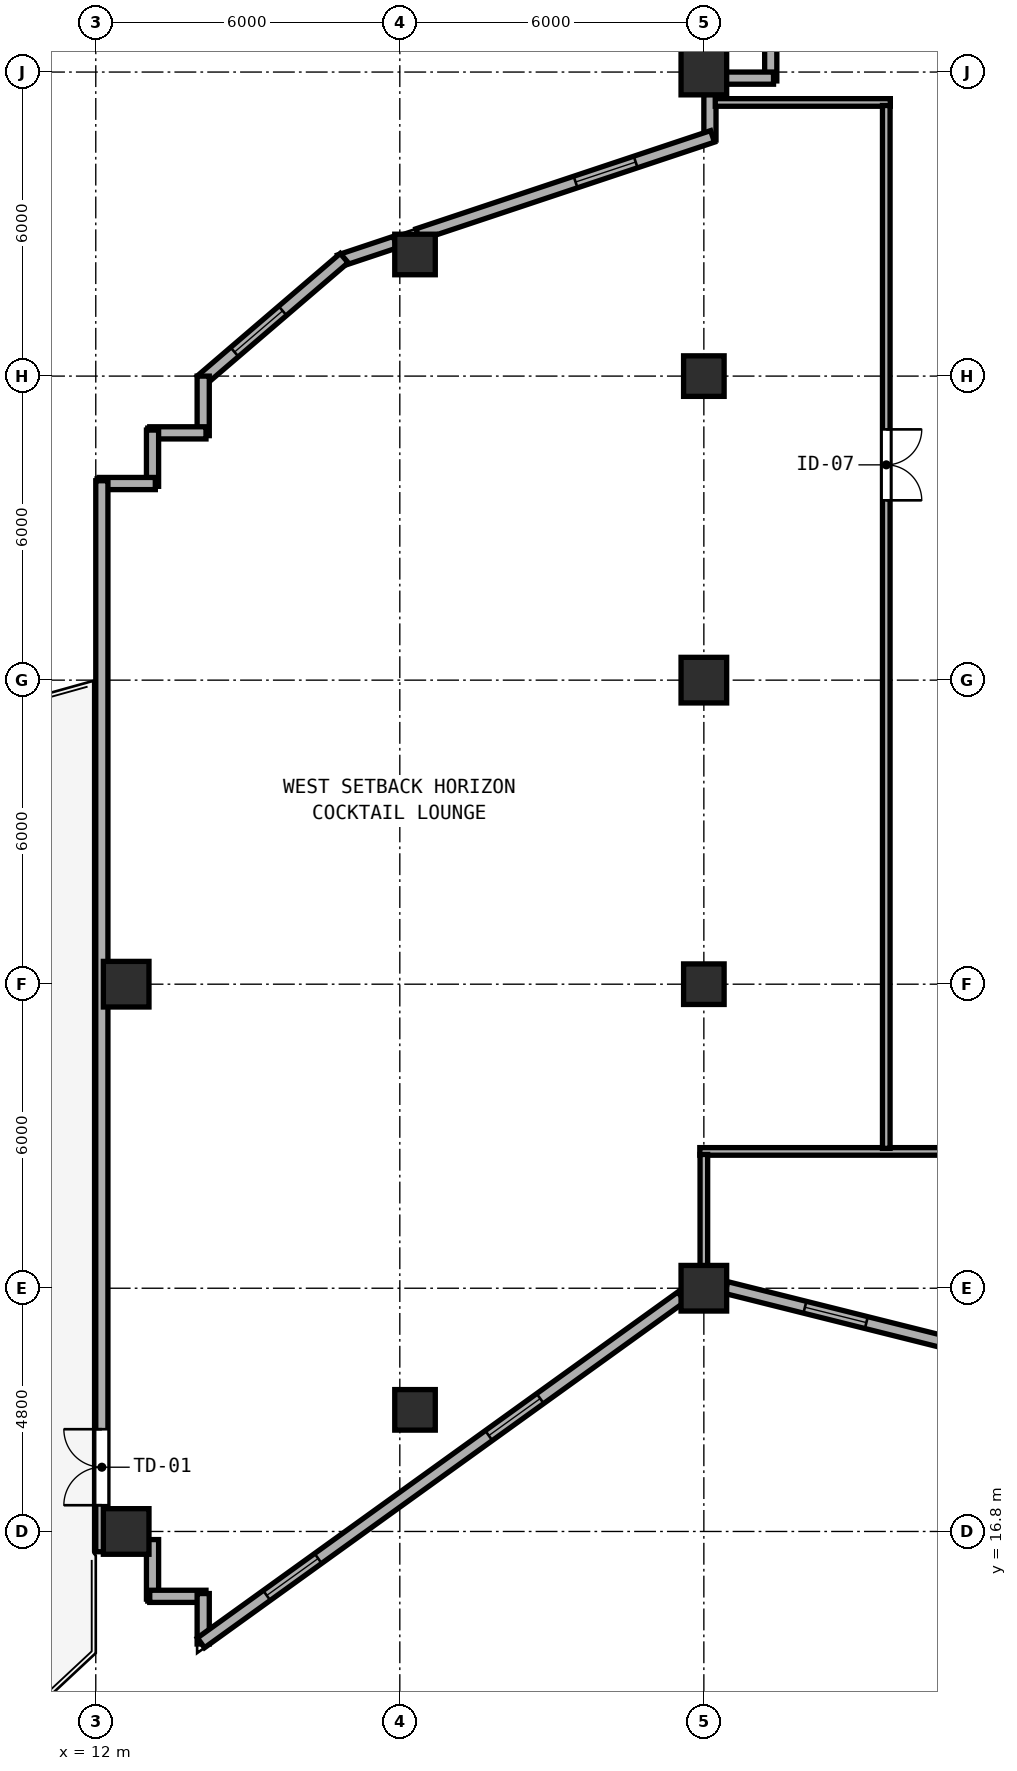
"""IFC4 building model, lengths in metres.
Left out: names, types, materials, properties, quantities, classifications, styles, units other than length and angle.
Written with IfcOpenShell. Run it as: python <this file> out.ifc"""

import sys

from ifc_helpers import new_model, si_unit, direction, frame, frame_2d, origin, origin_2d, place, context, subcontext, project, spatial, rectangle, hollow_rectangle, extrude, element, fill, save


model = new_model("IFC4")
c1 = context("Model", 3, precision=1e-05, world=origin(), true_north=direction((0.0, 1.0)))
c2 = subcontext(c1, "Body", "Model", "MODEL_VIEW")
j1 = project(units=[si_unit("LENGTHUNIT", "METRE"), si_unit("PLANEANGLEUNIT", "RADIAN")], contexts=[c1])
p1 = place(None, origin())
s1 = spatial("IfcSite", under=j1, at=p1, CompositionType="ELEMENT")
p2 = place(p1, origin())
s2 = spatial("IfcBuilding", under=s1, at=p2, CompositionType="ELEMENT")
p3 = place(p2, frame((0.0, 0.0, 164.6)))
s3 = spatial("IfcBuildingStorey", under=s2, at=p3, CompositionType="ELEMENT", Elevation=164.6)
for number, where, z_axis, x_axis in (
    (1, (24.0, 21.6, 0.0), (0.0, 0.0, 1.0), (1.0, 0.0, 0.0)),
    (2, (24.0, 33.6, 0.0), (0.0, 0.0, 1.0), (1.0, 0.0, 0.0)),
    (3, (24.0, 45.6, 0.0), (0.0, 0.0, 1.0), (1.0, 0.0, 0.0)),
    (4, (12.6, 16.8, 0.0), (0.0, 0.0, 1.0), (1.0, 0.0, 0.0)),
    (5, (12.6, 27.6, 0.0), (0.0, 0.0, 1.0), (1.0, 0.0, 0.0)),
):
    element("IfcColumn", number, at=place(p3, frame(where, z_axis=z_axis, x_axis=x_axis)), inside=s3, PredefinedType="COLUMN", context=c2, shape_type="SweptSolid", body=[
        extrude(hollow_rectangle(XDim=0.9, YDim=0.9, WallThickness=0.034, at=origin_2d()), origin(), (0.0, 0.0, 1.0), 4.4),
    ])
for number, where, z_axis, x_axis in (
    (6, (24.0, 27.6, 0.0), (0.0, 0.0, 1.0), (1.0, 0.0, 0.0)),
    (7, (24.0, 39.6, 0.0), (0.0, 0.0, 1.0), (1.0, 0.0, 0.0)),
    (8, (18.3, 19.2, 0.0), (0.0, 0.0, 1.0), (1.0, 0.0, 0.0)),
    (9, (18.3, 42.0, 0.0), (0.0, 0.0, 1.0), (1.0, 0.0, 0.0)),
):
    element("IfcColumn", number, at=place(p3, frame(where, z_axis=z_axis, x_axis=x_axis)), inside=s3, PredefinedType="COLUMN", context=c2, shape_type="SweptSolid", body=[
        extrude(hollow_rectangle(XDim=0.8, YDim=0.8, WallThickness=0.03, at=origin_2d()), origin(), (0.0, 0.0, 1.0), 4.4),
    ])
p4 = place(p3, frame((25.32, 46.735, 0.0), z_axis=(0.0, 0.0, 1.0), x_axis=(0.0, -1.0, 0.0)))
e10 = element("IfcWall", 10, at=p4, inside=s3, PredefinedType="SOLIDWALL", context=c2, shape_type="SweptSolid", body=[
    extrude(rectangle(XDim=1.31, YDim=0.24, at=frame_2d((0.655, 0.0))), origin(), (0.0, 0.0, 1.0), 4.22),
])
p5 = place(p3, frame((25.375, 45.48, 0.0), z_axis=(0.0, 0.0, 1.0), x_axis=(-1.0, 0.0, 0.0)))
e11 = element("IfcWall", 11, at=p5, inside=s3, PredefinedType="SOLIDWALL", context=c2, shape_type="SweptSolid", body=[
    extrude(rectangle(XDim=0.933, YDim=0.24, at=frame_2d((0.467, 0.0))), origin(), (0.0, 0.0, 1.0), 4.22),
])
p6 = place(p3, frame((24.12, 45.158, 0.0), z_axis=(0.0, 0.0, 1.0), x_axis=(0.0, -1.0, 0.0)))
e12 = element("IfcWall", 12, at=p6, inside=s3, PredefinedType="SOLIDWALL", context=c2, shape_type="SweptSolid", body=[
    extrude(rectangle(XDim=0.899, YDim=0.24, at=frame_2d((0.45, 0.0))), origin(), (0.0, 0.0, 1.0), 3.815),
])
p7 = place(p3, frame((24.172, 44.331, 0.0), z_axis=(0.0, 0.0, 1.0), x_axis=(-0.94869126158, -0.316203874426, 0.0)))
e13 = element("IfcWall", 13, at=p7, inside=s3, PredefinedType="SOLIDWALL", context=c2, shape_type="SweptSolid", body=[
    extrude(rectangle(XDim=6.131, YDim=0.24, at=frame_2d((3.066, 0.0))), origin(), (0.0, 0.0, 1.0), 3.815),
])
p8 = place(p7, frame((1.6, 0.0, 0.85)))
e14 = element("IfcOpeningElement", 14, at=p8, cuts=e13, PredefinedType="OPENING", context=c2, shape_type="SweptSolid", body=[
    extrude(rectangle(XDim=1.25, YDim=1.95, at=frame_2d((0.625, 0.975))), frame((0.0, 0.13, 0.0), z_axis=(0.0, -1.0, 0.0), x_axis=(1.0, 0.0, 0.0)), (0.0, 0.0, 1.0), 0.26),
])
p9 = place(p3, frame((17.908, 42.243, 0.0), z_axis=(0.0, 0.0, 1.0), x_axis=(-0.948662237962, -0.316290939272, 0.0)))
e15 = element("IfcWall", 15, at=p9, inside=s3, PredefinedType="SOLIDWALL", context=c2, shape_type="SweptSolid", body=[
    extrude(rectangle(XDim=1.159, YDim=0.24, at=frame_2d((0.58, 0.0))), origin(), (0.0, 0.0, 1.0), 4.22),
])
p10 = place(p3, frame((16.902, 41.929, 0.0), z_axis=(0.0, 0.0, 1.0), x_axis=(-0.759275136126, -0.650769750112, 0.0)))
e16 = element("IfcWall", 16, at=p10, inside=s3, PredefinedType="SOLIDWALL", context=c2, shape_type="SweptSolid", body=[
    extrude(rectangle(XDim=3.719, YDim=0.24, at=frame_2d((1.86, 0.0))), origin(), (0.0, 0.0, 1.0), 4.22),
])
p11 = place(p10, frame((1.6, 0.0, 0.85)))
e17 = element("IfcOpeningElement", 17, at=p11, cuts=e16, PredefinedType="OPENING", context=c2, shape_type="SweptSolid", body=[
    extrude(rectangle(XDim=1.25, YDim=1.95, at=frame_2d((0.625, 0.975))), frame((0.0, 0.13, 0.0), z_axis=(0.0, -1.0, 0.0), x_axis=(1.0, 0.0, 0.0)), (0.0, 0.0, 1.0), 0.26),
])
p12 = place(p3, frame((14.12, 39.6, 0.0), z_axis=(0.0, 0.0, 1.0), x_axis=(0.0, -1.0, 0.0)))
e18 = element("IfcWall", 18, at=p12, inside=s3, PredefinedType="SOLIDWALL", context=c2, shape_type="SweptSolid", body=[
    extrude(rectangle(XDim=1.175, YDim=0.24, at=frame_2d((0.587, 0.0))), origin(), (0.0, 0.0, 1.0), 4.22),
])
p13 = place(p3, frame((14.175, 38.48, 0.0), z_axis=(0.0, 0.0, 1.0), x_axis=(-1.0, 0.0, 0.0)))
e19 = element("IfcWall", 19, at=p13, inside=s3, PredefinedType="SOLIDWALL", context=c2, shape_type="SweptSolid", body=[
    extrude(rectangle(XDim=1.11, YDim=0.24, at=frame_2d((0.555, 0.0))), origin(), (0.0, 0.0, 1.0), 4.22),
])
p14 = place(p3, frame((13.12, 38.535, 0.0), z_axis=(0.0, 0.0, 1.0), x_axis=(0.0, -1.0, 0.0)))
e20 = element("IfcWall", 20, at=p14, inside=s3, PredefinedType="SOLIDWALL", context=c2, shape_type="SweptSolid", body=[
    extrude(rectangle(XDim=1.11, YDim=0.24, at=frame_2d((0.555, 0.0))), origin(), (0.0, 0.0, 1.0), 4.22),
])
p15 = place(p3, frame((13.175, 37.48, 0.0), z_axis=(0.0, 0.0, 1.0), x_axis=(-1.0, 0.0, 0.0)))
e21 = element("IfcWall", 21, at=p15, inside=s3, PredefinedType="SOLIDWALL", context=c2, shape_type="SweptSolid", body=[
    extrude(rectangle(XDim=1.11, YDim=0.24, at=frame_2d((0.555, 0.0))), origin(), (0.0, 0.0, 1.0), 4.22),
])
p16 = place(p3, frame((12.12, 37.535, 0.0), z_axis=(0.0, 0.0, 1.0), x_axis=(0.0, -1.0, 0.0)))
e22 = element("IfcWall", 22, at=p16, inside=s3, PredefinedType="SOLIDWALL", context=c2, shape_type="SweptSolid", body=[
    extrude(rectangle(XDim=21.135, YDim=0.24, at=frame_2d((10.567, 0.0))), origin(), (0.0, 0.0, 1.0), 4.22),
])
p17 = place(p16, frame((20.217, 0.0, 0.0), z_axis=(0.0, 0.0, 1.0), x_axis=(-1.0, 0.0, 0.0)))
e23 = element("IfcOpeningElement", 23, at=p17, cuts=e22, PredefinedType="OPENING", context=c2, shape_type="SweptSolid", body=[
    extrude(rectangle(XDim=1.5, YDim=2.2, at=frame_2d((0.75, 1.1))), frame((0.0, 0.13, 0.0), z_axis=(0.0, -1.0, 0.0), x_axis=(1.0, 0.0, 0.0)), (0.0, 0.0, 1.0), 0.26),
])
p18 = place(p3, frame((13.12, 16.64, 0.0), z_axis=(0.0, 0.0, 1.0), x_axis=(0.0, -1.0, 0.0)))
e24 = element("IfcWall", 24, at=p18, inside=s3, PredefinedType="SOLIDWALL", context=c2, shape_type="SweptSolid", body=[
    extrude(rectangle(XDim=1.175, YDim=0.24, at=frame_2d((0.587, 0.0))), origin(), (0.0, 0.0, 1.0), 4.22),
])
p19 = place(p3, frame((13.065, 15.52, 0.0), z_axis=(0.0, 0.0, 1.0), x_axis=(1.0, 0.0, 0.0)))
e25 = element("IfcWall", 25, at=p19, inside=s3, PredefinedType="SOLIDWALL", context=c2, shape_type="SweptSolid", body=[
    extrude(rectangle(XDim=1.11, YDim=0.24, at=frame_2d((0.555, 0.0))), origin(), (0.0, 0.0, 1.0), 4.22),
])
p20 = place(p3, frame((14.12, 15.575, 0.0), z_axis=(0.0, 0.0, 1.0), x_axis=(0.0, -1.0, 0.0)))
e26 = element("IfcWall", 26, at=p20, inside=s3, PredefinedType="SOLIDWALL", context=c2, shape_type="SweptSolid", body=[
    extrude(rectangle(XDim=0.996, YDim=0.24, at=frame_2d((0.498, 0.0))), origin(), (0.0, 0.0, 1.0), 4.22),
])
p21 = place(p3, frame((14.075, 14.602, 0.0), z_axis=(0.0, 0.0, 1.0), x_axis=(0.811539493337, 0.584297570381, 0.0)))
e27 = element("IfcWall", 27, at=p21, inside=s3, PredefinedType="SOLIDWALL", context=c2, shape_type="SweptSolid", body=[
    extrude(rectangle(XDim=11.685, YDim=0.24, at=frame_2d((5.842, 0.0))), origin(), (0.0, 0.0, 1.0), 3.815),
])
p22 = place(p21, frame((1.6, 0.0, 0.85)))
e28 = element("IfcOpeningElement", 28, at=p22, cuts=e27, PredefinedType="OPENING", context=c2, shape_type="SweptSolid", body=[
    extrude(rectangle(XDim=1.25, YDim=1.95, at=frame_2d((0.625, 0.975))), frame((0.0, 0.13, 0.0), z_axis=(0.0, -1.0, 0.0), x_axis=(1.0, 0.0, 0.0)), (0.0, 0.0, 1.0), 0.26),
])
p23 = place(p21, frame((7.0, 0.0, 0.85)))
e29 = element("IfcOpeningElement", 29, at=p23, cuts=e27, PredefinedType="OPENING", context=c2, shape_type="SweptSolid", body=[
    extrude(rectangle(XDim=1.25, YDim=1.95, at=frame_2d((0.625, 0.975))), frame((0.0, 0.13, 0.0), z_axis=(0.0, -1.0, 0.0), x_axis=(1.0, 0.0, 0.0)), (0.0, 0.0, 1.0), 0.26),
])
p24 = place(p3, frame((24.442, 21.613, 0.0), z_axis=(0.0, 0.0, 1.0), x_axis=(0.970136430837, -0.242559900978, 0.0)))
e30 = element("IfcWall", 30, at=p24, inside=s3, PredefinedType="SOLIDWALL", context=c2, shape_type="SweptSolid", body=[
    extrude(rectangle(XDim=4.733, YDim=0.24, at=frame_2d((2.366, 0.0))), origin(), (0.0, 0.0, 1.0), 3.815),
])
p25 = place(p24, frame((1.6, 0.0, 0.85)))
e31 = element("IfcOpeningElement", 31, at=p25, cuts=e30, PredefinedType="OPENING", context=c2, shape_type="SweptSolid", body=[
    extrude(rectangle(XDim=1.25, YDim=1.95, at=frame_2d((0.625, 0.975))), frame((0.0, 0.13, 0.0), z_axis=(0.0, -1.0, 0.0), x_axis=(1.0, 0.0, 0.0)), (0.0, 0.0, 1.0), 0.26),
])
p26 = place(p3, frame((23.92, 24.3, 0.0), z_axis=(0.0, 0.0, 1.0), x_axis=(1.0, 0.0, 0.0)))
e32 = element("IfcWall", 32, at=p26, inside=s3, PredefinedType="PARTITIONING", context=c2, shape_type="SweptSolid", body=[
    extrude(rectangle(XDim=28.96, YDim=0.15, at=frame_2d((14.48, 0.0))), origin(), (0.0, 0.0, 1.0), 4.22),
])
p27 = place(p26, frame((7.9, 0.0, 0.0), z_axis=(0.0, 0.0, 1.0), x_axis=(-1.0, 0.0, 0.0)))
e33 = element("IfcOpeningElement", 33, at=p27, cuts=e32, PredefinedType="OPENING", context=c2, shape_type="SweptSolid", body=[
    extrude(rectangle(XDim=1.4, YDim=2.18, at=frame_2d((0.7, 1.09))), frame((0.0, 0.085, 0.0), z_axis=(0.0, -1.0, 0.0), x_axis=(1.0, 0.0, 0.0)), (0.0, 0.0, 1.0), 0.17),
])
p28 = place(p3, frame((24.0, 21.819, 0.0), z_axis=(0.0, 0.0, 1.0), x_axis=(0.0, 1.0, 0.0)))
e34 = element("IfcWall", 34, at=p28, inside=s3, PredefinedType="PARTITIONING", context=c2, shape_type="SweptSolid", body=[
    extrude(rectangle(XDim=2.421, YDim=0.15, at=frame_2d((1.211, 0.0))), origin(), (0.0, 0.0, 1.0), 3.815),
])
p29 = place(p3, frame((24.225, 45.0, 0.0), z_axis=(0.0, 0.0, 1.0), x_axis=(1.0, 0.0, 0.0)))
e35 = element("IfcWall", 35, at=p29, inside=s3, PredefinedType="PARTITIONING", context=c2, shape_type="SweptSolid", body=[
    extrude(rectangle(XDim=3.455, YDim=0.15, at=frame_2d((1.728, 0.0))), origin(), (0.0, 0.0, 1.0), 4.22),
])
p30 = place(p3, frame((27.6, 24.36, 0.0), z_axis=(0.0, 0.0, 1.0), x_axis=(0.0, 1.0, 0.0)))
e36 = element("IfcWall", 36, at=p30, inside=s3, PredefinedType="PARTITIONING", context=c2, shape_type="SweptSolid", body=[
    extrude(rectangle(XDim=20.58, YDim=0.15, at=frame_2d((10.29, 0.0))), origin(), (0.0, 0.0, 1.0), 4.22),
])
p31 = place(p30, frame((14.188, 0.0, 0.0), z_axis=(0.0, 0.0, 1.0), x_axis=(-1.0, 0.0, 0.0)))
e37 = element("IfcOpeningElement", 37, at=p31, cuts=e36, PredefinedType="OPENING", context=c2, shape_type="SweptSolid", body=[
    extrude(rectangle(XDim=1.4, YDim=2.18, at=frame_2d((0.7, 1.09))), frame((0.0, 0.085, 0.0), z_axis=(0.0, -1.0, 0.0), x_axis=(1.0, 0.0, 0.0)), (0.0, 0.0, 1.0), 0.17),
])
p32 = place(p8, origin())
e38 = element("IfcWindow", 38, at=p32, inside=s3, PartitioningType="SINGLE_PANEL", PredefinedType="WINDOW", context=c2, shape_type="SweptSolid", body=[
    extrude(rectangle(XDim=1.25, YDim=1.95, at=frame_2d((0.625, 0.975))), frame((0.0, 0.03, 0.0), z_axis=(0.0, -1.0, 0.0), x_axis=(1.0, 0.0, 0.0)), (0.0, 0.0, 1.0), 0.06),
])
fill(e14, e38)
p33 = place(p11, origin())
e39 = element("IfcWindow", 39, at=p33, inside=s3, PartitioningType="SINGLE_PANEL", PredefinedType="WINDOW", context=c2, shape_type="SweptSolid", body=[
    extrude(rectangle(XDim=1.25, YDim=1.95, at=frame_2d((0.625, 0.975))), frame((0.0, 0.03, 0.0), z_axis=(0.0, -1.0, 0.0), x_axis=(1.0, 0.0, 0.0)), (0.0, 0.0, 1.0), 0.06),
])
fill(e17, e39)
p34 = place(p22, origin())
e40 = element("IfcWindow", 40, at=p34, inside=s3, PartitioningType="SINGLE_PANEL", PredefinedType="WINDOW", context=c2, shape_type="SweptSolid", body=[
    extrude(rectangle(XDim=1.25, YDim=1.95, at=frame_2d((0.625, 0.975))), frame((0.0, 0.03, 0.0), z_axis=(0.0, -1.0, 0.0), x_axis=(1.0, 0.0, 0.0)), (0.0, 0.0, 1.0), 0.06),
])
fill(e28, e40)
p35 = place(p23, origin())
e41 = element("IfcWindow", 41, at=p35, inside=s3, PartitioningType="SINGLE_PANEL", PredefinedType="WINDOW", context=c2, shape_type="SweptSolid", body=[
    extrude(rectangle(XDim=1.25, YDim=1.95, at=frame_2d((0.625, 0.975))), frame((0.0, 0.03, 0.0), z_axis=(0.0, -1.0, 0.0), x_axis=(1.0, 0.0, 0.0)), (0.0, 0.0, 1.0), 0.06),
])
fill(e29, e41)
p36 = place(p25, origin())
e42 = element("IfcWindow", 42, at=p36, inside=s3, PartitioningType="SINGLE_PANEL", PredefinedType="WINDOW", context=c2, shape_type="SweptSolid", body=[
    extrude(rectangle(XDim=1.25, YDim=1.95, at=frame_2d((0.625, 0.975))), frame((0.0, 0.03, 0.0), z_axis=(0.0, -1.0, 0.0), x_axis=(1.0, 0.0, 0.0)), (0.0, 0.0, 1.0), 0.06),
])
fill(e31, e42)
p37 = place(p17, origin())
e43 = element("IfcDoor", 43, at=p37, inside=s3, OperationType="DOUBLE_DOOR_SINGLE_SWING", PredefinedType="DOOR", context=c2, shape_type="SweptSolid", body=[
    extrude(rectangle(XDim=1.5, YDim=2.2, at=frame_2d((0.75, 1.1))), frame((0.0, 0.025, 0.0), z_axis=(0.0, -1.0, 0.0), x_axis=(1.0, 0.0, 0.0)), (0.0, 0.0, 1.0), 0.05),
])
fill(e23, e43)
p38 = place(p31, origin())
e44 = element("IfcDoor", 44, at=p38, inside=s3, OperationType="DOUBLE_DOOR_SINGLE_SWING", PredefinedType="DOOR", context=c2, shape_type="SweptSolid", body=[
    extrude(rectangle(XDim=1.4, YDim=2.18, at=frame_2d((0.7, 1.09))), frame((0.0, 0.025, 0.0), z_axis=(0.0, -1.0, 0.0), x_axis=(1.0, 0.0, 0.0)), (0.0, 0.0, 1.0), 0.05),
])
fill(e37, e44)
save(model, sys.argv[1])
